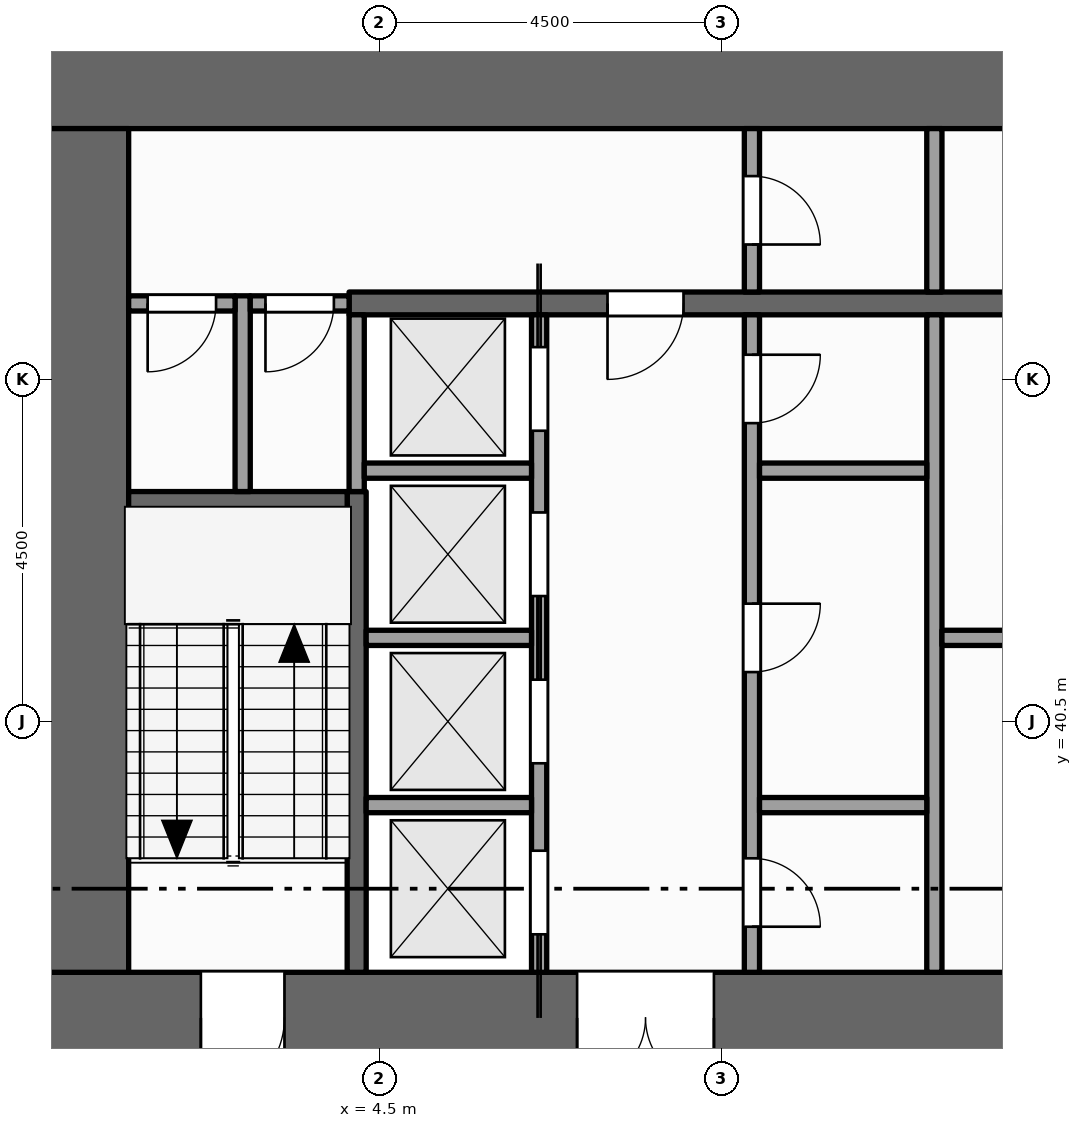
"""IFC4 building model, lengths in metres.
Left out: names, types, materials, properties, quantities, classifications, styles, units other than length and angle.
Written with IfcOpenShell. Run it as: python <this file> out.ifc"""

import sys

from ifc_helpers import new_model, si_unit, direction, frame, frame_2d, origin, place, context, subcontext, project, spatial, rectangle, extrude, element, fill, save


model = new_model("IFC4")
c1 = context("Model", 3, precision=1e-05, world=origin(), true_north=direction((0.0, 1.0)))
c2 = subcontext(c1, "Body", "Model", "MODEL_VIEW")
j1 = project(units=[si_unit("LENGTHUNIT", "METRE"), si_unit("PLANEANGLEUNIT", "RADIAN")], contexts=[c1])
p1 = place(None, origin())
s1 = spatial("IfcSite", under=j1, at=p1, CompositionType="ELEMENT")
p2 = place(p1, origin())
s2 = spatial("IfcBuilding", under=s1, at=p2, CompositionType="ELEMENT")
p3 = place(p2, frame((0.0, 0.0, 45.0)))
s3 = spatial("IfcBuildingStorey", under=s2, at=p3, CompositionType="ELEMENT", Elevation=45.0)
p4 = place(p3, frame((0.0, 36.6, -0.15), z_axis=(0.0, 0.0, 1.0), x_axis=(1.0, 0.0, 0.0)))
e1 = element("IfcWall", 1, at=p4, inside=s3, PredefinedType="SHEAR", context=c2, shape_type="SweptSolid", body=[
    extrude(rectangle(XDim=22.5, YDim=1.2, at=frame_2d((11.25, 0.0))), origin(), (0.0, 0.0, 1.0), 4.0),
])
p5 = place(p4, frame((7.1, 0.0, 0.15)))
e2 = element("IfcOpeningElement", 2, at=p5, cuts=e1, PredefinedType="OPENING", context=c2, shape_type="SweptSolid", body=[
    extrude(rectangle(XDim=1.8, YDim=2.1, at=frame_2d((0.9, 1.05))), frame((0.0, 0.61, 0.0), z_axis=(0.0, -1.0, 0.0), x_axis=(1.0, 0.0, 0.0)), (0.0, 0.0, 1.0), 1.22),
])
p6 = place(p4, frame((13.15, 0.0, 0.15)))
e3 = element("IfcOpeningElement", 3, at=p6, cuts=e1, PredefinedType="OPENING", context=c2, shape_type="SweptSolid", body=[
    extrude(rectangle(XDim=1.1, YDim=2.1, at=frame_2d((0.55, 1.05))), frame((0.0, 0.61, 0.0), z_axis=(0.0, -1.0, 0.0), x_axis=(1.0, 0.0, 0.0)), (0.0, 0.0, 1.0), 1.22),
])
p7 = place(p4, frame((2.15, 0.0, 0.15)))
e4 = element("IfcOpeningElement", 4, at=p7, cuts=e1, PredefinedType="OPENING", context=c2, shape_type="SweptSolid", body=[
    extrude(rectangle(XDim=1.1, YDim=2.1, at=frame_2d((0.55, 1.05))), frame((0.0, 0.61, 0.0), z_axis=(0.0, -1.0, 0.0), x_axis=(1.0, 0.0, 0.0)), (0.0, 0.0, 1.0), 1.22),
])
p8 = place(p4, frame((19.35, 0.0, 0.15)))
e5 = element("IfcOpeningElement", 5, at=p8, cuts=e1, PredefinedType="OPENING", context=c2, shape_type="SweptSolid", body=[
    extrude(rectangle(XDim=1.1, YDim=2.1, at=frame_2d((0.55, 1.05))), frame((0.0, 0.61, 0.0), z_axis=(0.0, -1.0, 0.0), x_axis=(1.0, 0.0, 0.0)), (0.0, 0.0, 1.0), 1.22),
])
p9 = place(p3, frame((0.0, 48.9, -0.15), z_axis=(0.0, 0.0, 1.0), x_axis=(1.0, 0.0, 0.0)))
e6 = element("IfcWall", 6, at=p9, inside=s3, PredefinedType="SHEAR", context=c2, shape_type="SweptSolid", body=[
    extrude(rectangle(XDim=22.5, YDim=1.2, at=frame_2d((11.25, 0.0))), origin(), (0.0, 0.0, 1.0), 4.0),
])
p10 = place(p3, frame((0.6, 37.2, -0.15), z_axis=(0.0, 0.0, 1.0), x_axis=(0.0, 1.0, 0.0)))
e7 = element("IfcWall", 7, at=p10, inside=s3, PredefinedType="SHEAR", context=c2, shape_type="SweptSolid", body=[
    extrude(rectangle(XDim=11.1, YDim=1.2, at=frame_2d((5.55, 0.0))), origin(), (0.0, 0.0, 1.0), 4.0),
])
p11 = place(p3, frame((2.7, 43.525, 0.0), z_axis=(0.0, 0.0, 1.0), x_axis=(0.0, 1.0, 0.0)))
e8 = element("IfcWall", 8, at=p11, inside=s3, PredefinedType="PARTITIONING", context=c2, shape_type="SweptSolid", body=[
    extrude(rectangle(XDim=2.575, YDim=0.2, at=frame_2d((1.288, 0.0))), origin(), (0.0, 0.0, 1.0), 3.85),
])
p12 = place(p3, frame((4.2, 37.2, 0.0), z_axis=(0.0, 0.0, 1.0), x_axis=(0.0, 1.0, 0.0)))
e9 = element("IfcWall", 9, at=p12, inside=s3, PredefinedType="SHEAR", context=c2, shape_type="SweptSolid", body=[
    extrude(rectangle(XDim=6.325, YDim=0.25, at=frame_2d((3.163, 0.0))), origin(), (0.0, 0.0, 1.0), 3.85),
])
p13 = place(p3, frame((4.2, 43.525, 0.0), z_axis=(0.0, 0.0, 1.0), x_axis=(0.0, 1.0, 0.0)))
e10 = element("IfcWall", 10, at=p13, inside=s3, PredefinedType="SOLIDWALL", context=c2, shape_type="SweptSolid", body=[
    extrude(rectangle(XDim=2.325, YDim=0.2, at=frame_2d((1.163, 0.0))), origin(), (0.0, 0.0, 1.0), 3.85),
])
p14 = place(p3, frame((6.6, 37.2, 0.0), z_axis=(0.0, 0.0, 1.0), x_axis=(0.0, 1.0, 0.0)))
e11 = element("IfcWall", 11, at=p14, inside=s3, PredefinedType="SOLIDWALL", context=c2, shape_type="SweptSolid", body=[
    extrude(rectangle(XDim=8.65, YDim=0.2, at=frame_2d((4.325, 0.0))), origin(), (0.0, 0.0, 1.0), 3.85),
])
p15 = place(p14, frame((0.5, 0.0, 0.012)))
e12 = element("IfcOpeningElement", 12, at=p15, cuts=e11, PredefinedType="OPENING", context=c2, shape_type="SweptSolid", body=[
    extrude(rectangle(XDim=1.1, YDim=2.1, at=frame_2d((0.55, 1.05))), frame((0.0, 0.11, 0.0), z_axis=(0.0, -1.0, 0.0), x_axis=(1.0, 0.0, 0.0)), (0.0, 0.0, 1.0), 0.22),
])
p16 = place(p14, frame((2.75, 0.0, 0.012)))
e13 = element("IfcOpeningElement", 13, at=p16, cuts=e11, PredefinedType="OPENING", context=c2, shape_type="SweptSolid", body=[
    extrude(rectangle(XDim=1.1, YDim=2.1, at=frame_2d((0.55, 1.05))), frame((0.0, 0.11, 0.0), z_axis=(0.0, -1.0, 0.0), x_axis=(1.0, 0.0, 0.0)), (0.0, 0.0, 1.0), 0.22),
])
p17 = place(p14, frame((4.95, 0.0, 0.012)))
e14 = element("IfcOpeningElement", 14, at=p17, cuts=e11, PredefinedType="OPENING", context=c2, shape_type="SweptSolid", body=[
    extrude(rectangle(XDim=1.1, YDim=2.1, at=frame_2d((0.55, 1.05))), frame((0.0, 0.11, 0.0), z_axis=(0.0, -1.0, 0.0), x_axis=(1.0, 0.0, 0.0)), (0.0, 0.0, 1.0), 0.22),
])
p18 = place(p14, frame((7.125, 0.0, 0.012)))
e15 = element("IfcOpeningElement", 15, at=p18, cuts=e11, PredefinedType="OPENING", context=c2, shape_type="SweptSolid", body=[
    extrude(rectangle(XDim=1.1, YDim=2.1, at=frame_2d((0.55, 1.05))), frame((0.0, 0.11, 0.0), z_axis=(0.0, -1.0, 0.0), x_axis=(1.0, 0.0, 0.0)), (0.0, 0.0, 1.0), 0.22),
])
p19 = place(p3, frame((9.4, 37.2, 0.0), z_axis=(0.0, 0.0, 1.0), x_axis=(0.0, 1.0, 0.0)))
e16 = element("IfcWall", 16, at=p19, inside=s3, PredefinedType="PARTITIONING", context=c2, shape_type="SweptSolid", body=[
    extrude(rectangle(XDim=8.65, YDim=0.2, at=frame_2d((4.325, 0.0))), origin(), (0.0, 0.0, 1.0), 3.85),
])
p20 = place(p19, frame((0.6, 0.0, 0.0)))
e17 = element("IfcOpeningElement", 17, at=p20, cuts=e16, PredefinedType="OPENING", context=c2, shape_type="SweptSolid", body=[
    extrude(rectangle(XDim=0.9, YDim=2.1, at=frame_2d((0.45, 1.05))), frame((0.0, 0.11, 0.0), z_axis=(0.0, -1.0, 0.0), x_axis=(1.0, 0.0, 0.0)), (0.0, 0.0, 1.0), 0.22),
])
p21 = place(p19, frame((3.95, 0.0, 0.0)))
e18 = element("IfcOpeningElement", 18, at=p21, cuts=e16, PredefinedType="OPENING", context=c2, shape_type="SweptSolid", body=[
    extrude(rectangle(XDim=0.9, YDim=2.1, at=frame_2d((0.45, 1.05))), frame((0.0, 0.11, 0.0), z_axis=(0.0, -1.0, 0.0), x_axis=(1.0, 0.0, 0.0)), (0.0, 0.0, 1.0), 0.22),
])
p22 = place(p19, frame((7.225, 0.0, 0.0)))
e19 = element("IfcOpeningElement", 19, at=p22, cuts=e16, PredefinedType="OPENING", context=c2, shape_type="SweptSolid", body=[
    extrude(rectangle(XDim=0.9, YDim=2.1, at=frame_2d((0.45, 1.05))), frame((0.0, 0.11, 0.0), z_axis=(0.0, -1.0, 0.0), x_axis=(1.0, 0.0, 0.0)), (0.0, 0.0, 1.0), 0.22),
])
p23 = place(p3, frame((9.4, 46.15, 0.0), z_axis=(0.0, 0.0, 1.0), x_axis=(0.0, 1.0, 0.0)))
e20 = element("IfcWall", 20, at=p23, inside=s3, PredefinedType="PARTITIONING", context=c2, shape_type="SweptSolid", body=[
    extrude(rectangle(XDim=2.15, YDim=0.2, at=frame_2d((1.075, 0.0))), origin(), (0.0, 0.0, 1.0), 3.85),
])
p24 = place(p23, frame((0.625, 0.0, 0.0)))
e21 = element("IfcOpeningElement", 21, at=p24, cuts=e20, PredefinedType="OPENING", context=c2, shape_type="SweptSolid", body=[
    extrude(rectangle(XDim=0.9, YDim=2.1, at=frame_2d((0.45, 1.05))), frame((0.0, 0.11, 0.0), z_axis=(0.0, -1.0, 0.0), x_axis=(1.0, 0.0, 0.0)), (0.0, 0.0, 1.0), 0.22),
])
p25 = place(p3, frame((11.8, 37.2, 0.0), z_axis=(0.0, 0.0, 1.0), x_axis=(0.0, 1.0, 0.0)))
e22 = element("IfcWall", 22, at=p25, inside=s3, PredefinedType="PARTITIONING", context=c2, shape_type="SweptSolid", body=[
    extrude(rectangle(XDim=8.65, YDim=0.2, at=frame_2d((4.325, 0.0))), origin(), (0.0, 0.0, 1.0), 3.85),
])
p26 = place(p3, frame((11.8, 46.15, 0.0), z_axis=(0.0, 0.0, 1.0), x_axis=(0.0, 1.0, 0.0)))
e23 = element("IfcWall", 23, at=p26, inside=s3, PredefinedType="PARTITIONING", context=c2, shape_type="SweptSolid", body=[
    extrude(rectangle(XDim=2.15, YDim=0.2, at=frame_2d((1.075, 0.0))), origin(), (0.0, 0.0, 1.0), 3.85),
])
p27 = place(p3, frame((4.325, 39.4, 0.0), z_axis=(0.0, 0.0, 1.0), x_axis=(1.0, 0.0, 0.0)))
e24 = element("IfcWall", 24, at=p27, inside=s3, PredefinedType="SOLIDWALL", context=c2, shape_type="SweptSolid", body=[
    extrude(rectangle(XDim=2.175, YDim=0.2, at=frame_2d((1.087, 0.0))), origin(), (0.0, 0.0, 1.0), 3.85),
])
p28 = place(p3, frame((9.5, 39.4, 0.0), z_axis=(0.0, 0.0, 1.0), x_axis=(1.0, 0.0, 0.0)))
e25 = element("IfcWall", 25, at=p28, inside=s3, PredefinedType="PARTITIONING", context=c2, shape_type="SweptSolid", body=[
    extrude(rectangle(XDim=2.2, YDim=0.2, at=frame_2d((1.1, 0.0))), origin(), (0.0, 0.0, 1.0), 3.85),
])
p29 = place(p3, frame((4.325, 41.6, 0.0), z_axis=(0.0, 0.0, 1.0), x_axis=(1.0, 0.0, 0.0)))
e26 = element("IfcWall", 26, at=p29, inside=s3, PredefinedType="SOLIDWALL", context=c2, shape_type="SweptSolid", body=[
    extrude(rectangle(XDim=2.175, YDim=0.2, at=frame_2d((1.087, 0.0))), origin(), (0.0, 0.0, 1.0), 3.85),
])
p30 = place(p3, frame((11.9, 41.6, 0.0), z_axis=(0.0, 0.0, 1.0), x_axis=(1.0, 0.0, 0.0)))
e27 = element("IfcWall", 27, at=p30, inside=s3, PredefinedType="PARTITIONING", context=c2, shape_type="SweptSolid", body=[
    extrude(rectangle(XDim=3.6, YDim=0.2, at=frame_2d((1.8, 0.0))), origin(), (0.0, 0.0, 1.0), 3.85),
])
p31 = place(p30, frame((1.3, 0.0, 0.0)))
e28 = element("IfcOpeningElement", 28, at=p31, cuts=e27, PredefinedType="OPENING", context=c2, shape_type="SweptSolid", body=[
    extrude(rectangle(XDim=1.0, YDim=2.1, at=frame_2d((0.5, 1.05))), frame((0.0, 0.11, 0.0), z_axis=(0.0, -1.0, 0.0), x_axis=(1.0, 0.0, 0.0)), (0.0, 0.0, 1.0), 0.22),
])
p32 = place(p3, frame((1.2, 43.4, 0.0), z_axis=(0.0, 0.0, 1.0), x_axis=(1.0, 0.0, 0.0)))
e29 = element("IfcWall", 29, at=p32, inside=s3, PredefinedType="SHEAR", context=c2, shape_type="SweptSolid", body=[
    extrude(rectangle(XDim=2.875, YDim=0.25, at=frame_2d((1.438, 0.0))), origin(), (0.0, 0.0, 1.0), 3.85),
])
p33 = place(p3, frame((4.3, 43.8, 0.0), z_axis=(0.0, 0.0, 1.0), x_axis=(1.0, 0.0, 0.0)))
e30 = element("IfcWall", 30, at=p33, inside=s3, PredefinedType="SOLIDWALL", context=c2, shape_type="SweptSolid", body=[
    extrude(rectangle(XDim=2.2, YDim=0.2, at=frame_2d((1.1, 0.0))), origin(), (0.0, 0.0, 1.0), 3.85),
])
p34 = place(p3, frame((9.5, 43.8, 0.0), z_axis=(0.0, 0.0, 1.0), x_axis=(1.0, 0.0, 0.0)))
e31 = element("IfcWall", 31, at=p34, inside=s3, PredefinedType="PARTITIONING", context=c2, shape_type="SweptSolid", body=[
    extrude(rectangle(XDim=2.2, YDim=0.2, at=frame_2d((1.1, 0.0))), origin(), (0.0, 0.0, 1.0), 3.85),
])
p35 = place(p3, frame((1.2, 46.0, 0.0), z_axis=(0.0, 0.0, 1.0), x_axis=(1.0, 0.0, 0.0)))
e32 = element("IfcWall", 32, at=p35, inside=s3, PredefinedType="PARTITIONING", context=c2, shape_type="SweptSolid", body=[
    extrude(rectangle(XDim=1.4, YDim=0.2, at=frame_2d((0.7, 0.0))), origin(), (0.0, 0.0, 1.0), 3.85),
])
p36 = place(p35, frame((0.25, 0.0, 0.0)))
e33 = element("IfcOpeningElement", 33, at=p36, cuts=e32, PredefinedType="OPENING", context=c2, shape_type="SweptSolid", body=[
    extrude(rectangle(XDim=0.9, YDim=2.1, at=frame_2d((0.45, 1.05))), frame((0.0, 0.11, 0.0), z_axis=(0.0, -1.0, 0.0), x_axis=(1.0, 0.0, 0.0)), (0.0, 0.0, 1.0), 0.22),
])
p37 = place(p3, frame((2.8, 46.0, 0.0), z_axis=(0.0, 0.0, 1.0), x_axis=(1.0, 0.0, 0.0)))
e34 = element("IfcWall", 34, at=p37, inside=s3, PredefinedType="PARTITIONING", context=c2, shape_type="SweptSolid", body=[
    extrude(rectangle(XDim=1.3, YDim=0.2, at=frame_2d((0.65, 0.0))), origin(), (0.0, 0.0, 1.0), 3.85),
])
p38 = place(p37, frame((0.2, 0.0, 0.0)))
e35 = element("IfcOpeningElement", 35, at=p38, cuts=e34, PredefinedType="OPENING", context=c2, shape_type="SweptSolid", body=[
    extrude(rectangle(XDim=0.9, YDim=2.1, at=frame_2d((0.45, 1.05))), frame((0.0, 0.11, 0.0), z_axis=(0.0, -1.0, 0.0), x_axis=(1.0, 0.0, 0.0)), (0.0, 0.0, 1.0), 0.22),
])
p39 = place(p3, frame((4.1, 46.0, 0.0), z_axis=(0.0, 0.0, 1.0), x_axis=(1.0, 0.0, 0.0)))
e36 = element("IfcWall", 36, at=p39, inside=s3, PredefinedType="SHEAR", context=c2, shape_type="SweptSolid", body=[
    extrude(rectangle(XDim=14.5, YDim=0.3, at=frame_2d((7.25, 0.0))), origin(), (0.0, 0.0, 1.0), 3.85),
])
p40 = place(p39, frame((3.4, 0.0, 0.0)))
e37 = element("IfcOpeningElement", 37, at=p40, cuts=e36, PredefinedType="OPENING", context=c2, shape_type="SweptSolid", body=[
    extrude(rectangle(XDim=1.0, YDim=2.1, at=frame_2d((0.5, 1.05))), frame((0.0, 0.16, 0.0), z_axis=(0.0, -1.0, 0.0), x_axis=(1.0, 0.0, 0.0)), (0.0, 0.0, 1.0), 0.32),
])
p41 = place(p39, frame((9.1, 0.0, 0.0)))
e38 = element("IfcOpeningElement", 38, at=p41, cuts=e36, PredefinedType="OPENING", context=c2, shape_type="SweptSolid", body=[
    extrude(rectangle(XDim=1.0, YDim=2.1, at=frame_2d((0.5, 1.05))), frame((0.0, 0.16, 0.0), z_axis=(0.0, -1.0, 0.0), x_axis=(1.0, 0.0, 0.0)), (0.0, 0.0, 1.0), 0.32),
])
p42 = place(p15, origin())
e39 = element("IfcDoor", 39, at=p42, inside=s3, OperationType="SLIDING_TO_LEFT", PredefinedType="DOOR", context=c2, shape_type="SweptSolid", body=[
    extrude(rectangle(XDim=1.1, YDim=2.1, at=frame_2d((0.55, 1.05))), frame((0.0, 0.025, 0.0), z_axis=(0.0, -1.0, 0.0), x_axis=(1.0, 0.0, 0.0)), (0.0, 0.0, 1.0), 0.05),
])
fill(e12, e39)
p43 = place(p16, origin())
e40 = element("IfcDoor", 40, at=p43, inside=s3, OperationType="SLIDING_TO_RIGHT", PredefinedType="DOOR", context=c2, shape_type="SweptSolid", body=[
    extrude(rectangle(XDim=1.1, YDim=2.1, at=frame_2d((0.55, 1.05))), frame((0.0, 0.025, 0.0), z_axis=(0.0, -1.0, 0.0), x_axis=(1.0, 0.0, 0.0)), (0.0, 0.0, 1.0), 0.05),
])
fill(e13, e40)
p44 = place(p17, origin())
e41 = element("IfcDoor", 41, at=p44, inside=s3, OperationType="SLIDING_TO_LEFT", PredefinedType="DOOR", context=c2, shape_type="SweptSolid", body=[
    extrude(rectangle(XDim=1.1, YDim=2.1, at=frame_2d((0.55, 1.05))), frame((0.0, 0.025, 0.0), z_axis=(0.0, -1.0, 0.0), x_axis=(1.0, 0.0, 0.0)), (0.0, 0.0, 1.0), 0.05),
])
fill(e14, e41)
p45 = place(p18, origin())
e42 = element("IfcDoor", 42, at=p45, inside=s3, OperationType="SLIDING_TO_RIGHT", PredefinedType="DOOR", context=c2, shape_type="SweptSolid", body=[
    extrude(rectangle(XDim=1.1, YDim=2.1, at=frame_2d((0.55, 1.05))), frame((0.0, 0.025, 0.0), z_axis=(0.0, -1.0, 0.0), x_axis=(1.0, 0.0, 0.0)), (0.0, 0.0, 1.0), 0.05),
])
fill(e15, e42)
p46 = place(p5, origin())
e43 = element("IfcDoor", 43, at=p46, inside=s3, OperationType="DOUBLE_DOOR_SINGLE_SWING", PredefinedType="DOOR", context=c2, shape_type="SweptSolid", body=[
    extrude(rectangle(XDim=1.8, YDim=2.1, at=frame_2d((0.9, 1.05))), frame((0.0, 0.025, 0.0), z_axis=(0.0, -1.0, 0.0), x_axis=(1.0, 0.0, 0.0)), (0.0, 0.0, 1.0), 0.05),
])
fill(e2, e43)
p47 = place(p40, origin())
e44 = element("IfcDoor", 44, at=p47, inside=s3, OperationType="SINGLE_SWING_LEFT", PredefinedType="DOOR", context=c2, shape_type="SweptSolid", body=[
    extrude(rectangle(XDim=1.0, YDim=2.1, at=frame_2d((0.5, 1.05))), frame((0.0, 0.025, 0.0), z_axis=(0.0, -1.0, 0.0), x_axis=(1.0, 0.0, 0.0)), (0.0, 0.0, 1.0), 0.05),
])
fill(e37, e44)
p48 = place(p24, origin())
e45 = element("IfcDoor", 45, at=p48, inside=s3, OperationType="SINGLE_SWING_LEFT", PredefinedType="DOOR", context=c2, shape_type="SweptSolid", body=[
    extrude(rectangle(XDim=0.9, YDim=2.1, at=frame_2d((0.45, 1.05))), frame((0.0, 0.025, 0.0), z_axis=(0.0, -1.0, 0.0), x_axis=(1.0, 0.0, 0.0)), (0.0, 0.0, 1.0), 0.05),
])
fill(e21, e45)
p49 = place(p7, origin())
e46 = element("IfcDoor", 46, at=p49, inside=s3, OperationType="SINGLE_SWING_LEFT", PredefinedType="DOOR", context=c2, shape_type="SweptSolid", body=[
    extrude(rectangle(XDim=1.1, YDim=2.1, at=frame_2d((0.55, 1.05))), frame((0.0, 0.025, 0.0), z_axis=(0.0, -1.0, 0.0), x_axis=(1.0, 0.0, 0.0)), (0.0, 0.0, 1.0), 0.05),
])
fill(e4, e46)
p50 = place(p36, origin())
e47 = element("IfcDoor", 47, at=p50, inside=s3, OperationType="SINGLE_SWING_LEFT", PredefinedType="DOOR", context=c2, shape_type="SweptSolid", body=[
    extrude(rectangle(XDim=0.9, YDim=2.1, at=frame_2d((0.45, 1.05))), frame((0.0, 0.025, 0.0), z_axis=(0.0, -1.0, 0.0), x_axis=(1.0, 0.0, 0.0)), (0.0, 0.0, 1.0), 0.05),
])
fill(e33, e47)
p51 = place(p38, origin())
e48 = element("IfcDoor", 48, at=p51, inside=s3, OperationType="SINGLE_SWING_LEFT", PredefinedType="DOOR", context=c2, shape_type="SweptSolid", body=[
    extrude(rectangle(XDim=0.9, YDim=2.1, at=frame_2d((0.45, 1.05))), frame((0.0, 0.025, 0.0), z_axis=(0.0, -1.0, 0.0), x_axis=(1.0, 0.0, 0.0)), (0.0, 0.0, 1.0), 0.05),
])
fill(e35, e48)
p52 = place(p20, origin())
e49 = element("IfcDoor", 49, at=p52, inside=s3, OperationType="SINGLE_SWING_LEFT", PredefinedType="DOOR", context=c2, shape_type="SweptSolid", body=[
    extrude(rectangle(XDim=0.9, YDim=2.1, at=frame_2d((0.45, 1.05))), frame((0.0, 0.025, 0.0), z_axis=(0.0, -1.0, 0.0), x_axis=(1.0, 0.0, 0.0)), (0.0, 0.0, 1.0), 0.05),
])
fill(e17, e49)
p53 = place(p21, origin())
e50 = element("IfcDoor", 50, at=p53, inside=s3, OperationType="SINGLE_SWING_RIGHT", PredefinedType="DOOR", context=c2, shape_type="SweptSolid", body=[
    extrude(rectangle(XDim=0.9, YDim=2.1, at=frame_2d((0.45, 1.05))), frame((0.0, 0.025, 0.0), z_axis=(0.0, -1.0, 0.0), x_axis=(1.0, 0.0, 0.0)), (0.0, 0.0, 1.0), 0.05),
])
fill(e18, e50)
p54 = place(p22, origin())
e51 = element("IfcDoor", 51, at=p54, inside=s3, OperationType="SINGLE_SWING_RIGHT", PredefinedType="DOOR", context=c2, shape_type="SweptSolid", body=[
    extrude(rectangle(XDim=0.9, YDim=2.1, at=frame_2d((0.45, 1.05))), frame((0.0, 0.025, 0.0), z_axis=(0.0, -1.0, 0.0), x_axis=(1.0, 0.0, 0.0)), (0.0, 0.0, 1.0), 0.05),
])
fill(e19, e51)
save(model, sys.argv[1])
